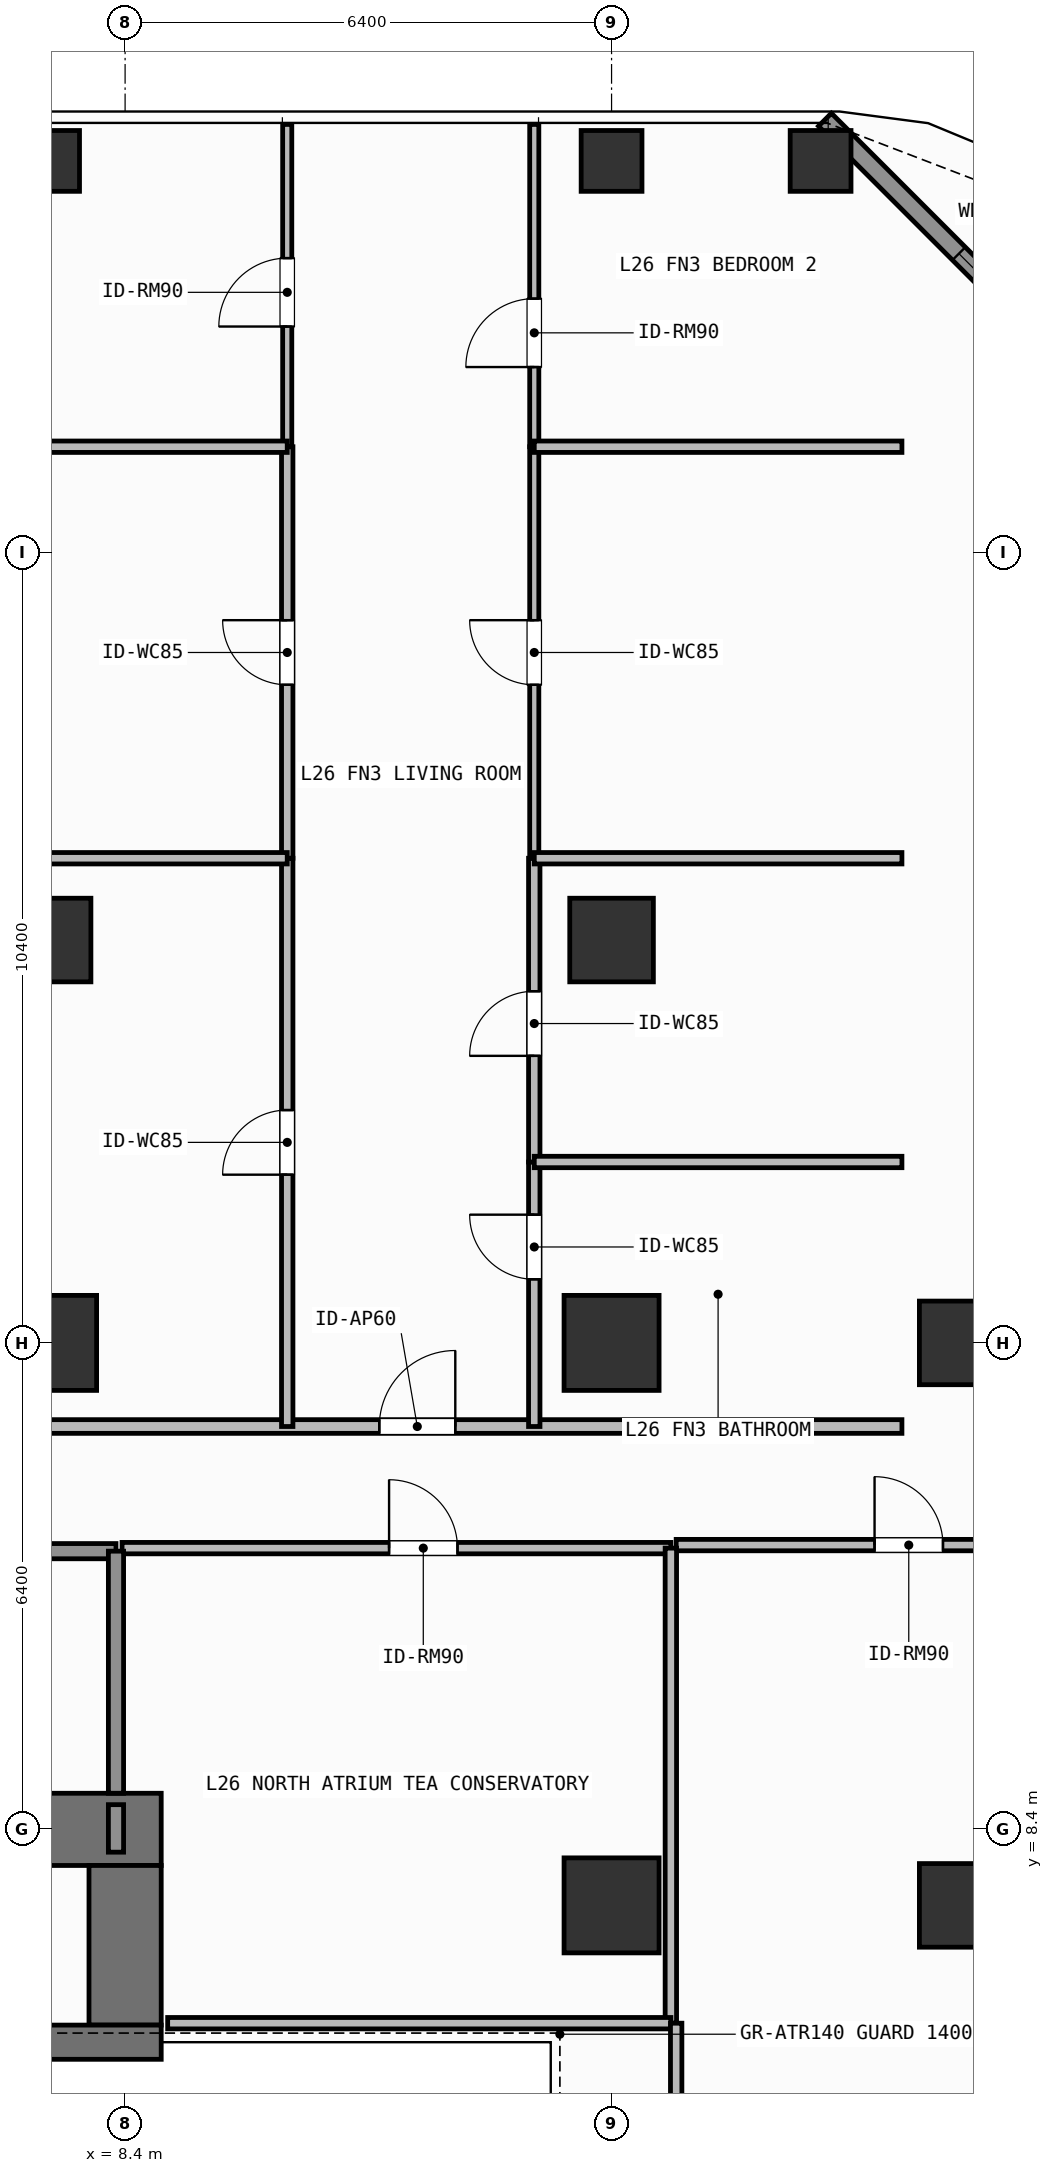
"""IFC4 building model, lengths in metres.
Left out: names, types, materials, properties, quantities, classifications, styles, units other than length and angle.
Written with IfcOpenShell. Run it as: python <this file> out.ifc"""

import sys

from ifc_helpers import new_model, si_unit, direction, frame, frame_2d, origin, origin_2d, place, context, subcontext, project, spatial, rectangle, hollow_rectangle, extrude, element, fill, save


model = new_model("IFC4")
c1 = context("Model", 3, precision=1e-05, world=origin(), true_north=direction((0.0, 1.0)))
c2 = subcontext(c1, "Body", "Model", "MODEL_VIEW")
j1 = project(units=[si_unit("LENGTHUNIT", "METRE"), si_unit("PLANEANGLEUNIT", "RADIAN")], contexts=[c1])
p1 = place(None, origin())
s1 = spatial("IfcSite", under=j1, at=p1, CompositionType="ELEMENT")
p2 = place(p1, origin())
s2 = spatial("IfcBuilding", under=s1, at=p2, CompositionType="ELEMENT")
p3 = place(p2, frame((0.0, 0.0, 104.7)))
s3 = spatial("IfcBuildingStorey", under=s2, at=p3, CompositionType="ELEMENT", Elevation=104.7)
p4 = place(p3, frame((-7.55, 8.4, 0.0), z_axis=(0.0, 0.0, 1.0), x_axis=(1.0, 0.0, 0.0)))
e1 = element("IfcWall", 1, at=p4, inside=s3, PredefinedType="SHEAR", context=c2, shape_type="SweptSolid", body=[
    extrude(rectangle(XDim=16.425, YDim=0.95, at=frame_2d((8.212, 0.0))), origin(), (0.0, 0.0, 1.0), 3.9),
])
p5 = place(p3, frame((8.4, 5.825, 0.0), z_axis=(0.0, 0.0, 1.0), x_axis=(0.0, 1.0, 0.0)))
e2 = element("IfcWall", 2, at=p5, inside=s3, PredefinedType="SHEAR", context=c2, shape_type="SweptSolid", body=[
    extrude(rectangle(XDim=2.1, YDim=0.95, at=frame_2d((1.05, 0.0))), origin(), (0.0, 0.0, 1.0), 3.9),
])
p6 = place(p3, frame((3.045, 5.6, 0.0), z_axis=(0.0, 0.0, 1.0), x_axis=(1.0, 0.0, 0.0)))
e3 = element("IfcWall", 3, at=p6, inside=s3, PredefinedType="SHEAR", context=c2, shape_type="SweptSolid", body=[
    extrude(rectangle(XDim=5.83, YDim=0.45, at=frame_2d((2.915, 0.0))), origin(), (0.0, 0.0, 1.0), 3.9),
])
for number, where, z_axis, x_axis in (
    (4, (7.4, 14.8, 0.0), (0.0, 0.0, 1.0), (1.0, 0.0, 0.0)),
    (5, (14.8, 14.8, 0.0), (0.0, 0.0, 1.0), (1.0, 0.0, 0.0)),
    (6, (14.8, 7.4, 0.0), (0.0, 0.0, 1.0), (1.0, 0.0, 0.0)),
):
    element("IfcColumn", number, at=place(p3, frame(where, z_axis=z_axis, x_axis=x_axis)), inside=s3, PredefinedType="COLUMN", context=c2, shape_type="SweptSolid", body=[
        extrude(rectangle(XDim=1.25, YDim=1.25, at=origin_2d()), origin(), (0.0, 0.0, 1.0), 3.9),
    ])
for number, where, z_axis, x_axis in (
    (7, (19.4, 7.4, 0.0), (0.0, 0.0, 1.0), (1.0, 0.0, 0.0)),
    (8, (19.4, 14.8, 0.0), (0.0, 0.0, 1.0), (1.0, 0.0, 0.0)),
    (9, (7.4, 20.1, 0.0), (0.0, 0.0, 1.0), (1.0, 0.0, 0.0)),
    (10, (14.8, 20.1, 0.0), (0.0, 0.0, 1.0), (1.0, 0.0, 0.0)),
):
    element("IfcColumn", number, at=place(p3, frame(where, z_axis=z_axis, x_axis=x_axis)), inside=s3, PredefinedType="COLUMN", context=c2, shape_type="SweptSolid", body=[
        extrude(rectangle(XDim=1.1, YDim=1.1, at=origin_2d()), origin(), (0.0, 0.0, 1.0), 3.9),
    ])
for number, where, z_axis, x_axis in (
    (11, (17.55, 30.35, 0.0), (0.0, 0.0, 1.0), (1.0, 0.0, 0.0)),
    (12, (7.4, 30.35, 0.0), (0.0, 0.0, 1.0), (1.0, 0.0, 0.0)),
    (13, (14.8, 30.35, 0.0), (0.0, 0.0, 1.0), (1.0, 0.0, 0.0)),
):
    element("IfcColumn", number, at=place(p3, frame(where, z_axis=z_axis, x_axis=x_axis)), inside=s3, PredefinedType="COLUMN", context=c2, shape_type="SweptSolid", body=[
        extrude(hollow_rectangle(XDim=0.8, YDim=0.8, WallThickness=0.036, at=origin_2d()), origin(), (0.0, 0.0, 1.0), 3.9),
    ])
p7 = place(p3, frame((17.608, 30.892, 0.0), z_axis=(0.0, 0.0, 1.0), x_axis=(0.707106781187, -0.707106781187, 0.0)))
e14 = element("IfcWall", 14, at=p7, inside=s3, PredefinedType="SOLIDWALL", context=c2, shape_type="SweptSolid", body=[
    extrude(rectangle(XDim=6.484, YDim=0.24, at=frame_2d((3.242, 0.0))), origin(), (0.0, 0.0, 1.0), 3.62),
])
p8 = place(p7, frame((2.492, 0.0, 0.8)))
e15 = element("IfcOpeningElement", 15, at=p8, cuts=e14, PredefinedType="OPENING", context=c2, shape_type="SweptSolid", body=[
    extrude(rectangle(XDim=1.5, YDim=1.85, at=frame_2d((0.75, 0.925))), frame((0.0, 0.13, 0.0), z_axis=(0.0, -1.0, 0.0), x_axis=(1.0, 0.0, 0.0)), (0.0, 0.0, 1.0), 0.26),
])
p9 = place(p3, frame((4.58, 12.06, 0.0), z_axis=(0.0, 0.0, 1.0), x_axis=(1.0, 0.0, 0.0)))
e16 = element("IfcWall", 16, at=p9, inside=s3, PredefinedType="SOLIDWALL", context=c2, shape_type="SweptSolid", body=[
    extrude(rectangle(XDim=3.7, YDim=0.2, at=frame_2d((1.85, 0.0))), origin(), (0.0, 0.0, 1.0), 3.62),
])
p10 = place(p9, frame((1.212, 0.0, 0.0)))
e17 = element("IfcOpeningElement", 17, at=p10, cuts=e16, PredefinedType="OPENING", context=c2, shape_type="SweptSolid", body=[
    extrude(rectangle(XDim=1.1, YDim=2.15, at=frame_2d((0.55, 1.075))), frame((0.0, 0.11, 0.0), z_axis=(0.0, -1.0, 0.0), x_axis=(1.0, 0.0, 0.0)), (0.0, 0.0, 1.0), 0.22),
])
p11 = place(p3, frame((8.36, 12.1, 0.0), z_axis=(0.0, 0.0, 1.0), x_axis=(1.0, 0.0, 0.0)))
e18 = element("IfcWall", 18, at=p11, inside=s3, PredefinedType="PARTITIONING", context=c2, shape_type="SweptSolid", body=[
    extrude(rectangle(XDim=7.22, YDim=0.15, at=frame_2d((3.61, 0.0))), origin(), (0.0, 0.0, 1.0), 3.62),
])
p12 = place(p11, frame((3.513, 0.0, 0.0)))
e19 = element("IfcOpeningElement", 19, at=p12, cuts=e18, PredefinedType="OPENING", context=c2, shape_type="SweptSolid", body=[
    extrude(rectangle(XDim=0.9, YDim=2.1, at=frame_2d((0.45, 1.05))), frame((0.0, 0.085, 0.0), z_axis=(0.0, -1.0, 0.0), x_axis=(1.0, 0.0, 0.0)), (0.0, 0.0, 1.0), 0.17),
])
p13 = place(p3, frame((6.404, 13.7, 0.0), z_axis=(0.0, 0.0, 1.0), x_axis=(1.0, 0.0, 0.0)))
e20 = element("IfcWall", 20, at=p13, inside=s3, PredefinedType="PARTITIONING", context=c2, shape_type="SweptSolid", body=[
    extrude(rectangle(XDim=12.216, YDim=0.18, at=frame_2d((6.108, 0.0))), origin(), (0.0, 0.0, 1.0), 3.62),
])
p14 = place(p13, frame((5.34, 0.0, 0.0)))
e21 = element("IfcOpeningElement", 21, at=p14, cuts=e20, PredefinedType="OPENING", context=c2, shape_type="SweptSolid", body=[
    extrude(rectangle(XDim=1.0, YDim=2.2, at=frame_2d((0.5, 1.1))), frame((0.0, 0.1, 0.0), z_axis=(0.0, -1.0, 0.0), x_axis=(1.0, 0.0, 0.0)), (0.0, 0.0, 1.0), 0.2),
])
p15 = place(p3, frame((10.533, 13.7, 0.0), z_axis=(0.0, 0.0, 1.0), x_axis=(0.0, 1.0, 0.0)))
e22 = element("IfcWall", 22, at=p15, inside=s3, PredefinedType="PARTITIONING", context=c2, shape_type="SweptSolid", body=[
    extrude(rectangle(XDim=7.476, YDim=0.15, at=frame_2d((3.738, 0.0))), origin(), (0.0, 0.0, 1.0), 3.62),
])
p16 = place(p15, frame((3.313, 0.0, 0.0)))
e23 = element("IfcOpeningElement", 23, at=p16, cuts=e22, PredefinedType="OPENING", context=c2, shape_type="SweptSolid", body=[
    extrude(rectangle(XDim=0.85, YDim=2.1, at=frame_2d((0.425, 1.05))), frame((0.0, 0.085, 0.0), z_axis=(0.0, -1.0, 0.0), x_axis=(1.0, 0.0, 0.0)), (0.0, 0.0, 1.0), 0.17),
])
p17 = place(p3, frame((10.533, 21.176, 0.0), z_axis=(0.0, 0.0, 1.0), x_axis=(0.0, 1.0, 0.0)))
e24 = element("IfcWall", 24, at=p17, inside=s3, PredefinedType="PARTITIONING", context=c2, shape_type="SweptSolid", body=[
    extrude(rectangle(XDim=5.414, YDim=0.15, at=frame_2d((2.707, 0.0))), origin(), (0.0, 0.0, 1.0), 3.62),
])
p18 = place(p17, frame((2.282, 0.0, 0.0)))
e25 = element("IfcOpeningElement", 25, at=p18, cuts=e24, PredefinedType="OPENING", context=c2, shape_type="SweptSolid", body=[
    extrude(rectangle(XDim=0.85, YDim=2.1, at=frame_2d((0.425, 1.05))), frame((0.0, 0.085, 0.0), z_axis=(0.0, -1.0, 0.0), x_axis=(1.0, 0.0, 0.0)), (0.0, 0.0, 1.0), 0.17),
])
p19 = place(p3, frame((10.533, 26.59, 0.0), z_axis=(0.0, 0.0, 1.0), x_axis=(0.0, 1.0, 0.0)))
e26 = element("IfcWall", 26, at=p19, inside=s3, PredefinedType="PARTITIONING", context=c2, shape_type="SweptSolid", body=[
    extrude(rectangle(XDim=4.24, YDim=0.12, at=frame_2d((2.12, 0.0))), origin(), (0.0, 0.0, 1.0), 3.62),
])
p20 = place(p19, frame((1.581, 0.0, 0.0)))
e27 = element("IfcOpeningElement", 27, at=p20, cuts=e26, PredefinedType="OPENING", context=c2, shape_type="SweptSolid", body=[
    extrude(rectangle(XDim=0.9, YDim=2.1, at=frame_2d((0.45, 1.05))), frame((0.0, 0.07, 0.0), z_axis=(0.0, -1.0, 0.0), x_axis=(1.0, 0.0, 0.0)), (0.0, 0.0, 1.0), 0.14),
])
p21 = place(p3, frame((13.783, 13.7, 0.0), z_axis=(0.0, 0.0, 1.0), x_axis=(0.0, 1.0, 0.0)))
e28 = element("IfcWall", 28, at=p21, inside=s3, PredefinedType="PARTITIONING", context=c2, shape_type="SweptSolid", body=[
    extrude(rectangle(XDim=3.48, YDim=0.15, at=frame_2d((1.74, 0.0))), origin(), (0.0, 0.0, 1.0), 3.62),
])
p22 = place(p21, frame((1.937, 0.0, 0.0)))
e29 = element("IfcOpeningElement", 29, at=p22, cuts=e28, PredefinedType="OPENING", context=c2, shape_type="SweptSolid", body=[
    extrude(rectangle(XDim=0.85, YDim=2.1, at=frame_2d((0.425, 1.05))), frame((0.0, 0.085, 0.0), z_axis=(0.0, -1.0, 0.0), x_axis=(1.0, 0.0, 0.0)), (0.0, 0.0, 1.0), 0.17),
])
p23 = place(p3, frame((13.783, 17.18, 0.0), z_axis=(0.0, 0.0, 1.0), x_axis=(0.0, 1.0, 0.0)))
e30 = element("IfcWall", 30, at=p23, inside=s3, PredefinedType="PARTITIONING", context=c2, shape_type="SweptSolid", body=[
    extrude(rectangle(XDim=3.996, YDim=0.15, at=frame_2d((1.998, 0.0))), origin(), (0.0, 0.0, 1.0), 3.62),
])
p24 = place(p23, frame((1.396, 0.0, 0.0)))
e31 = element("IfcOpeningElement", 31, at=p24, cuts=e30, PredefinedType="OPENING", context=c2, shape_type="SweptSolid", body=[
    extrude(rectangle(XDim=0.85, YDim=2.1, at=frame_2d((0.425, 1.05))), frame((0.0, 0.085, 0.0), z_axis=(0.0, -1.0, 0.0), x_axis=(1.0, 0.0, 0.0)), (0.0, 0.0, 1.0), 0.17),
])
p25 = place(p3, frame((13.783, 21.176, 0.0), z_axis=(0.0, 0.0, 1.0), x_axis=(0.0, 1.0, 0.0)))
e32 = element("IfcWall", 32, at=p25, inside=s3, PredefinedType="PARTITIONING", context=c2, shape_type="SweptSolid", body=[
    extrude(rectangle(XDim=5.414, YDim=0.12, at=frame_2d((2.707, 0.0))), origin(), (0.0, 0.0, 1.0), 3.62),
])
p26 = place(p25, frame((2.282, 0.0, 0.0)))
e33 = element("IfcOpeningElement", 33, at=p26, cuts=e32, PredefinedType="OPENING", context=c2, shape_type="SweptSolid", body=[
    extrude(rectangle(XDim=0.85, YDim=2.1, at=frame_2d((0.425, 1.05))), frame((0.0, 0.07, 0.0), z_axis=(0.0, -1.0, 0.0), x_axis=(1.0, 0.0, 0.0)), (0.0, 0.0, 1.0), 0.14),
])
p27 = place(p3, frame((13.783, 26.59, 0.0), z_axis=(0.0, 0.0, 1.0), x_axis=(0.0, 1.0, 0.0)))
e34 = element("IfcWall", 34, at=p27, inside=s3, PredefinedType="PARTITIONING", context=c2, shape_type="SweptSolid", body=[
    extrude(rectangle(XDim=4.24, YDim=0.12, at=frame_2d((2.12, 0.0))), origin(), (0.0, 0.0, 1.0), 3.62),
])
p28 = place(p27, frame((1.048, 0.0, 0.0)))
e35 = element("IfcOpeningElement", 35, at=p28, cuts=e34, PredefinedType="OPENING", context=c2, shape_type="SweptSolid", body=[
    extrude(rectangle(XDim=0.9, YDim=2.1, at=frame_2d((0.45, 1.05))), frame((0.0, 0.07, 0.0), z_axis=(0.0, -1.0, 0.0), x_axis=(1.0, 0.0, 0.0)), (0.0, 0.0, 1.0), 0.14),
])
p29 = place(p3, frame((15.65, 12.14, 0.0), z_axis=(0.0, 0.0, 1.0), x_axis=(1.0, 0.0, 0.0)))
e36 = element("IfcWall", 36, at=p29, inside=s3, PredefinedType="PARTITIONING", context=c2, shape_type="SweptSolid", body=[
    extrude(rectangle(XDim=6.47, YDim=0.15, at=frame_2d((3.235, 0.0))), origin(), (0.0, 0.0, 1.0), 3.62),
])
p30 = place(p29, frame((2.61, 0.0, 0.0)))
e37 = element("IfcOpeningElement", 37, at=p30, cuts=e36, PredefinedType="OPENING", context=c2, shape_type="SweptSolid", body=[
    extrude(rectangle(XDim=0.9, YDim=2.1, at=frame_2d((0.45, 1.05))), frame((0.0, 0.085, 0.0), z_axis=(0.0, -1.0, 0.0), x_axis=(1.0, 0.0, 0.0)), (0.0, 0.0, 1.0), 0.17),
])
p31 = place(p3, frame((8.28, 8.875, 0.0), z_axis=(0.0, 0.0, 1.0), x_axis=(0.0, 1.0, 0.0)))
e38 = element("IfcWall", 38, at=p31, inside=s3, PredefinedType="SOLIDWALL", context=c2, shape_type="SweptSolid", body=[
    extrude(rectangle(XDim=3.185, YDim=0.2, at=frame_2d((1.593, 0.0))), origin(), (0.0, 0.0, 1.0), 3.62),
])
p32 = place(p3, frame((8.28, 8.1, 0.0), z_axis=(0.0, 0.0, 1.0), x_axis=(0.0, 1.0, 0.0)))
e39 = element("IfcWall", 39, at=p32, inside=s3, PredefinedType="SOLIDWALL", context=c2, shape_type="SweptSolid", body=[
    extrude(rectangle(XDim=0.625, YDim=0.2, at=frame_2d((0.312, 0.0))), origin(), (0.0, 0.0, 1.0), 3.62),
])
p33 = place(p3, frame((15.58, 5.85, 0.0), z_axis=(0.0, 0.0, 1.0), x_axis=(0.0, 1.0, 0.0)))
e40 = element("IfcWall", 40, at=p33, inside=s3, PredefinedType="PARTITIONING", context=c2, shape_type="SweptSolid", body=[
    extrude(rectangle(XDim=6.25, YDim=0.15, at=frame_2d((3.125, 0.0))), origin(), (0.0, 0.0, 1.0), 3.62),
])
p34 = place(p3, frame((8.96, 5.85, 0.0), z_axis=(0.0, 0.0, 1.0), x_axis=(1.0, 0.0, 0.0)))
e41 = element("IfcWall", 41, at=p34, inside=s3, PredefinedType="PARTITIONING", context=c2, shape_type="SweptSolid", body=[
    extrude(rectangle(XDim=6.62, YDim=0.15, at=frame_2d((3.31, 0.0))), origin(), (0.0, 0.0, 1.0), 3.62),
])
for number, where, z_axis, x_axis in (
    (42, (6.404, 21.176, 0.0), (0.0, 0.0, 1.0), (1.0, 0.0, 0.0)),
    (43, (6.404, 26.59, 0.0), (0.0, 0.0, 1.0), (1.0, 0.0, 0.0)),
):
    element("IfcWall", number, at=place(p3, frame(where, z_axis=z_axis, x_axis=x_axis)), inside=s3, PredefinedType="PARTITIONING", context=c2, shape_type="SweptSolid", body=[
        extrude(rectangle(XDim=4.129, YDim=0.15, at=frame_2d((2.064, 0.0))), origin(), (0.0, 0.0, 1.0), 3.62),
    ])
for number, where, z_axis, x_axis in (
    (44, (13.783, 17.18, 0.0), (0.0, 0.0, 1.0), (1.0, 0.0, 0.0)),
    (45, (13.783, 21.176, 0.0), (0.0, 0.0, 1.0), (1.0, 0.0, 0.0)),
    (46, (13.783, 26.59, 0.0), (0.0, 0.0, 1.0), (1.0, 0.0, 0.0)),
):
    element("IfcWall", number, at=place(p3, frame(where, z_axis=z_axis, x_axis=x_axis)), inside=s3, PredefinedType="PARTITIONING", context=c2, shape_type="SweptSolid", body=[
        extrude(rectangle(XDim=4.837, YDim=0.15, at=frame_2d((2.418, 0.0))), origin(), (0.0, 0.0, 1.0), 3.62),
    ])
p35 = place(p3, frame((15.65, -2.75, 0.0), z_axis=(0.0, 0.0, 1.0), x_axis=(0.0, 1.0, 0.0)))
e47 = element("IfcWall", 47, at=p35, inside=s3, PredefinedType="PARTITIONING", context=c2, shape_type="SweptSolid", body=[
    extrude(rectangle(XDim=8.6, YDim=0.15, at=frame_2d((4.3, 0.0))), origin(), (0.0, 0.0, 1.0), 3.62),
])
p36 = place(p8, origin())
e48 = element("IfcWindow", 48, at=p36, inside=s3, PartitioningType="SINGLE_PANEL", PredefinedType="WINDOW", context=c2, shape_type="SweptSolid", body=[
    extrude(rectangle(XDim=1.5, YDim=1.85, at=frame_2d((0.75, 0.925))), frame((0.0, 0.03, 0.0), z_axis=(0.0, -1.0, 0.0), x_axis=(1.0, 0.0, 0.0)), (0.0, 0.0, 1.0), 0.06),
])
fill(e15, e48)
p37 = place(p12, origin())
e49 = element("IfcDoor", 49, at=p37, inside=s3, OperationType="SINGLE_SWING_LEFT", PredefinedType="DOOR", context=c2, shape_type="SweptSolid", body=[
    extrude(rectangle(XDim=0.9, YDim=2.1, at=frame_2d((0.45, 1.05))), frame((0.0, 0.025, 0.0), z_axis=(0.0, -1.0, 0.0), x_axis=(1.0, 0.0, 0.0)), (0.0, 0.0, 1.0), 0.05),
])
fill(e19, e49)
p38 = place(p14, origin())
e50 = element("IfcDoor", 50, at=p38, inside=s3, OperationType="SINGLE_SWING_RIGHT", PredefinedType="DOOR", context=c2, shape_type="SweptSolid", body=[
    extrude(rectangle(XDim=1.0, YDim=2.2, at=frame_2d((0.5, 1.1))), frame((0.0, 0.025, 0.0), z_axis=(0.0, -1.0, 0.0), x_axis=(1.0, 0.0, 0.0)), (0.0, 0.0, 1.0), 0.05),
])
fill(e21, e50)
p39 = place(p16, origin())
e51 = element("IfcDoor", 51, at=p39, inside=s3, OperationType="SINGLE_SWING_LEFT", PredefinedType="DOOR", context=c2, shape_type="SweptSolid", body=[
    extrude(rectangle(XDim=0.85, YDim=2.1, at=frame_2d((0.425, 1.05))), frame((0.0, 0.025, 0.0), z_axis=(0.0, -1.0, 0.0), x_axis=(1.0, 0.0, 0.0)), (0.0, 0.0, 1.0), 0.05),
])
fill(e23, e51)
p40 = place(p18, origin())
e52 = element("IfcDoor", 52, at=p40, inside=s3, OperationType="SINGLE_SWING_RIGHT", PredefinedType="DOOR", context=c2, shape_type="SweptSolid", body=[
    extrude(rectangle(XDim=0.85, YDim=2.1, at=frame_2d((0.425, 1.05))), frame((0.0, 0.025, 0.0), z_axis=(0.0, -1.0, 0.0), x_axis=(1.0, 0.0, 0.0)), (0.0, 0.0, 1.0), 0.05),
])
fill(e25, e52)
p41 = place(p20, origin())
e53 = element("IfcDoor", 53, at=p41, inside=s3, OperationType="SINGLE_SWING_LEFT", PredefinedType="DOOR", context=c2, shape_type="SweptSolid", body=[
    extrude(rectangle(XDim=0.9, YDim=2.1, at=frame_2d((0.45, 1.05))), frame((0.0, 0.025, 0.0), z_axis=(0.0, -1.0, 0.0), x_axis=(1.0, 0.0, 0.0)), (0.0, 0.0, 1.0), 0.05),
])
fill(e27, e53)
p42 = place(p22, origin())
e54 = element("IfcDoor", 54, at=p42, inside=s3, OperationType="SINGLE_SWING_RIGHT", PredefinedType="DOOR", context=c2, shape_type="SweptSolid", body=[
    extrude(rectangle(XDim=0.85, YDim=2.1, at=frame_2d((0.425, 1.05))), frame((0.0, 0.025, 0.0), z_axis=(0.0, -1.0, 0.0), x_axis=(1.0, 0.0, 0.0)), (0.0, 0.0, 1.0), 0.05),
])
fill(e29, e54)
p43 = place(p24, origin())
e55 = element("IfcDoor", 55, at=p43, inside=s3, OperationType="SINGLE_SWING_LEFT", PredefinedType="DOOR", context=c2, shape_type="SweptSolid", body=[
    extrude(rectangle(XDim=0.85, YDim=2.1, at=frame_2d((0.425, 1.05))), frame((0.0, 0.025, 0.0), z_axis=(0.0, -1.0, 0.0), x_axis=(1.0, 0.0, 0.0)), (0.0, 0.0, 1.0), 0.05),
])
fill(e31, e55)
p44 = place(p26, origin())
e56 = element("IfcDoor", 56, at=p44, inside=s3, OperationType="SINGLE_SWING_RIGHT", PredefinedType="DOOR", context=c2, shape_type="SweptSolid", body=[
    extrude(rectangle(XDim=0.85, YDim=2.1, at=frame_2d((0.425, 1.05))), frame((0.0, 0.025, 0.0), z_axis=(0.0, -1.0, 0.0), x_axis=(1.0, 0.0, 0.0)), (0.0, 0.0, 1.0), 0.05),
])
fill(e33, e56)
p45 = place(p28, origin())
e57 = element("IfcDoor", 57, at=p45, inside=s3, OperationType="SINGLE_SWING_LEFT", PredefinedType="DOOR", context=c2, shape_type="SweptSolid", body=[
    extrude(rectangle(XDim=0.9, YDim=2.1, at=frame_2d((0.45, 1.05))), frame((0.0, 0.025, 0.0), z_axis=(0.0, -1.0, 0.0), x_axis=(1.0, 0.0, 0.0)), (0.0, 0.0, 1.0), 0.05),
])
fill(e35, e57)
p46 = place(p30, origin())
e58 = element("IfcDoor", 58, at=p46, inside=s3, OperationType="SINGLE_SWING_LEFT", PredefinedType="DOOR", context=c2, shape_type="SweptSolid", body=[
    extrude(rectangle(XDim=0.9, YDim=2.1, at=frame_2d((0.45, 1.05))), frame((0.0, 0.025, 0.0), z_axis=(0.0, -1.0, 0.0), x_axis=(1.0, 0.0, 0.0)), (0.0, 0.0, 1.0), 0.05),
])
fill(e37, e58)
save(model, sys.argv[1])
